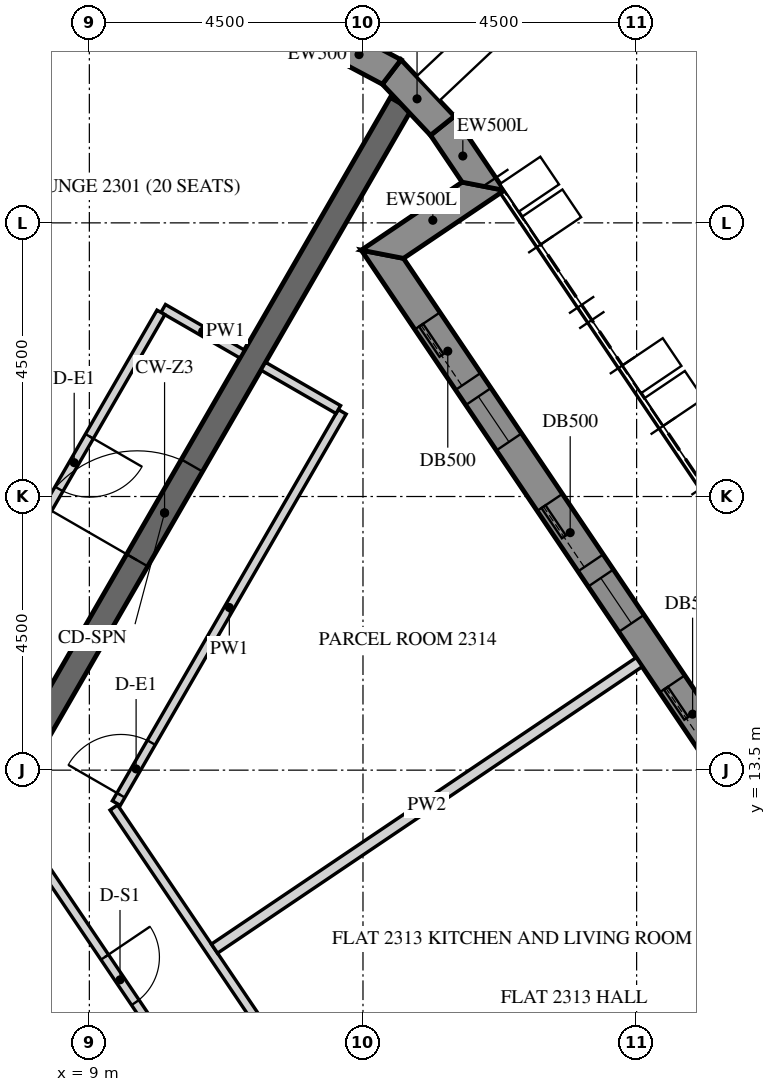
"""IFC4 building model, lengths in metres.
Left out: names, types, materials, properties, quantities, classifications, styles, units other than length and angle.
Written with IfcOpenShell. Run it as: python <this file> out.ifc"""

import sys

from ifc_helpers import new_model, si_unit, direction, frame, frame_2d, origin, place, context, subcontext, project, spatial, polyline, rectangle, outline, extrude, element, fill, save


model = new_model("IFC4")
c1 = context("Model", 3, precision=1e-05, world=origin(), true_north=direction((0.0, 1.0)))
c2 = subcontext(c1, "Body", "Model", "MODEL_VIEW")
j1 = project(units=[si_unit("LENGTHUNIT", "METRE"), si_unit("PLANEANGLEUNIT", "RADIAN")], contexts=[c1])
p1 = place(None, origin())
s1 = spatial("IfcSite", under=j1, at=p1, CompositionType="ELEMENT")
p2 = place(p1, origin())
s2 = spatial("IfcBuilding", under=s1, at=p2, CompositionType="ELEMENT")
p3 = place(p2, frame((0.0, 0.0, 291.3)))
s3 = spatial("IfcBuildingStorey", under=s2, at=p3, CompositionType="ELEMENT", Elevation=291.3)
p4 = place(p3, frame((26.706, 2.879, -0.15), z_axis=(0.0, 0.0, 1.0), x_axis=(-0.559197891507, 0.829034208061, 0.0)))
e1 = element("IfcWall", 1, at=p4, inside=s3, PredefinedType="SOLIDWALL", context=c2, shape_type="SweptSolid", body=[
    extrude(outline(polyline([(0.25, -0.25), (22.795, -0.25), (23.295, 0.25), (-0.25, 0.25), (0.25, -0.25)])), origin(), (0.0, 0.0, 1.0), 3.9),
])
p5 = place(p4, frame((1.323, 0.0, 1.05)))
e2 = element("IfcOpeningElement", 2, at=p5, cuts=e1, PredefinedType="OPENING", context=c2, shape_type="SweptSolid", body=[
    extrude(rectangle(XDim=0.9, YDim=1.5, at=frame_2d((0.45, 0.75))), frame((0.0, 0.26, 0.0), z_axis=(0.0, -1.0, 0.0), x_axis=(1.0, 0.0, 0.0)), (0.0, 0.0, 1.0), 0.52),
])
p6 = place(p4, frame((2.522, 0.0, 0.15)))
e3 = element("IfcOpeningElement", 3, at=p6, cuts=e1, PredefinedType="OPENING", context=c2, shape_type="SweptSolid", body=[
    extrude(rectangle(XDim=1.2, YDim=2.4, at=frame_2d((0.6, 1.2))), frame((0.0, 0.26, 0.0), z_axis=(0.0, -1.0, 0.0), x_axis=(1.0, 0.0, 0.0)), (0.0, 0.0, 1.0), 0.52),
])
p7 = place(p4, frame((4.922, 0.0, 1.05)))
e4 = element("IfcOpeningElement", 4, at=p7, cuts=e1, PredefinedType="OPENING", context=c2, shape_type="SweptSolid", body=[
    extrude(rectangle(XDim=0.9, YDim=1.5, at=frame_2d((0.45, 0.75))), frame((0.0, 0.26, 0.0), z_axis=(0.0, -1.0, 0.0), x_axis=(1.0, 0.0, 0.0)), (0.0, 0.0, 1.0), 0.52),
])
p8 = place(p4, frame((6.122, 0.0, 0.15)))
e5 = element("IfcOpeningElement", 5, at=p8, cuts=e1, PredefinedType="OPENING", context=c2, shape_type="SweptSolid", body=[
    extrude(rectangle(XDim=1.2, YDim=2.4, at=frame_2d((0.6, 1.2))), frame((0.0, 0.26, 0.0), z_axis=(0.0, -1.0, 0.0), x_axis=(1.0, 0.0, 0.0)), (0.0, 0.0, 1.0), 0.52),
])
p9 = place(p4, frame((8.522, 0.0, 1.05)))
e6 = element("IfcOpeningElement", 6, at=p9, cuts=e1, PredefinedType="OPENING", context=c2, shape_type="SweptSolid", body=[
    extrude(rectangle(XDim=0.9, YDim=1.5, at=frame_2d((0.45, 0.75))), frame((0.0, 0.26, 0.0), z_axis=(0.0, -1.0, 0.0), x_axis=(1.0, 0.0, 0.0)), (0.0, 0.0, 1.0), 0.52),
])
p10 = place(p4, frame((9.722, 0.0, 0.15)))
e7 = element("IfcOpeningElement", 7, at=p10, cuts=e1, PredefinedType="OPENING", context=c2, shape_type="SweptSolid", body=[
    extrude(rectangle(XDim=1.2, YDim=2.4, at=frame_2d((0.6, 1.2))), frame((0.0, 0.26, 0.0), z_axis=(0.0, -1.0, 0.0), x_axis=(1.0, 0.0, 0.0)), (0.0, 0.0, 1.0), 0.52),
])
p11 = place(p4, frame((12.122, 0.0, 1.05)))
e8 = element("IfcOpeningElement", 8, at=p11, cuts=e1, PredefinedType="OPENING", context=c2, shape_type="SweptSolid", body=[
    extrude(rectangle(XDim=0.9, YDim=1.5, at=frame_2d((0.45, 0.75))), frame((0.0, 0.26, 0.0), z_axis=(0.0, -1.0, 0.0), x_axis=(1.0, 0.0, 0.0)), (0.0, 0.0, 1.0), 0.52),
])
p12 = place(p4, frame((13.323, 0.0, 0.15)))
e9 = element("IfcOpeningElement", 9, at=p12, cuts=e1, PredefinedType="OPENING", context=c2, shape_type="SweptSolid", body=[
    extrude(rectangle(XDim=1.2, YDim=2.4, at=frame_2d((0.6, 1.2))), frame((0.0, 0.26, 0.0), z_axis=(0.0, -1.0, 0.0), x_axis=(1.0, 0.0, 0.0)), (0.0, 0.0, 1.0), 0.52),
])
p13 = place(p4, frame((15.722, 0.0, 1.05)))
e10 = element("IfcOpeningElement", 10, at=p13, cuts=e1, PredefinedType="OPENING", context=c2, shape_type="SweptSolid", body=[
    extrude(rectangle(XDim=0.9, YDim=1.5, at=frame_2d((0.45, 0.75))), frame((0.0, 0.26, 0.0), z_axis=(0.0, -1.0, 0.0), x_axis=(1.0, 0.0, 0.0)), (0.0, 0.0, 1.0), 0.52),
])
p14 = place(p4, frame((16.922, 0.0, 0.15)))
e11 = element("IfcOpeningElement", 11, at=p14, cuts=e1, PredefinedType="OPENING", context=c2, shape_type="SweptSolid", body=[
    extrude(rectangle(XDim=1.2, YDim=2.4, at=frame_2d((0.6, 1.2))), frame((0.0, 0.26, 0.0), z_axis=(0.0, -1.0, 0.0), x_axis=(1.0, 0.0, 0.0)), (0.0, 0.0, 1.0), 0.52),
])
p15 = place(p4, frame((19.323, 0.0, 1.05)))
e12 = element("IfcOpeningElement", 12, at=p15, cuts=e1, PredefinedType="OPENING", context=c2, shape_type="SweptSolid", body=[
    extrude(rectangle(XDim=0.9, YDim=1.5, at=frame_2d((0.45, 0.75))), frame((0.0, 0.26, 0.0), z_axis=(0.0, -1.0, 0.0), x_axis=(1.0, 0.0, 0.0)), (0.0, 0.0, 1.0), 0.52),
])
p16 = place(p4, frame((20.522, 0.0, 0.15)))
e13 = element("IfcOpeningElement", 13, at=p16, cuts=e1, PredefinedType="OPENING", context=c2, shape_type="SweptSolid", body=[
    extrude(rectangle(XDim=1.2, YDim=2.4, at=frame_2d((0.6, 1.2))), frame((0.0, 0.26, 0.0), z_axis=(0.0, -1.0, 0.0), x_axis=(1.0, 0.0, 0.0)), (0.0, 0.0, 1.0), 0.52),
])
p17 = place(p3, frame((13.819, 21.984, -0.15), z_axis=(0.0, 0.0, 1.0), x_axis=(0.829052389485, 0.559170935841, 0.0)))
e14 = element("IfcWall", 14, at=p17, inside=s3, PredefinedType="SOLIDWALL", context=c2, shape_type="SweptSolid", body=[
    extrude(outline(polyline([(0.25, -0.25), (2.25, -0.25), (1.75, 0.25), (-0.25, 0.25), (0.25, -0.25)])), origin(), (0.0, 0.0, 1.0), 3.9),
])
p18 = place(p3, frame((15.478, 23.102, -0.15), z_axis=(0.0, 0.0, 1.0), x_axis=(-0.559245726333, 0.829001940636, 0.0)))
e15 = element("IfcWall", 15, at=p18, inside=s3, PredefinedType="SOLIDWALL", context=c2, shape_type="SweptSolid", body=[
    extrude(outline(polyline([(-0.25, -0.25), (1.221, -0.25), (1.18, 0.25), (0.25, 0.25), (-0.25, -0.25)])), origin(), (0.0, 0.0, 1.0), 3.9),
])
p19 = place(p3, frame((14.806, 24.097, -0.15), z_axis=(0.0, 0.0, 1.0), x_axis=(-0.686234452793, 0.727380420275, 0.0)))
e16 = element("IfcWall", 16, at=p19, inside=s3, PredefinedType="SOLIDWALL", context=c2, shape_type="SweptSolid", body=[
    extrude(outline(polyline([(-0.021, -0.25), (1.257, -0.25), (1.175, 0.25), (0.021, 0.25), (-0.021, -0.25)])), origin(), (0.0, 0.0, 1.0), 3.9),
])
p20 = place(p3, frame((13.972, 24.982, -0.15), z_axis=(0.0, 0.0, 1.0), x_axis=(-0.882902492938, 0.469556373575, 0.0)))
e17 = element("IfcWall", 17, at=p20, inside=s3, PredefinedType="SOLIDWALL", context=c2, shape_type="SweptSolid", body=[
    extrude(outline(polyline([(-0.041, -0.25), (1.257, -0.25), (1.175, 0.25), (0.041, 0.25), (-0.041, -0.25)])), origin(), (0.0, 0.0, 1.0), 3.9),
])
p21 = place(p3, frame((12.471, 0.0, -0.15), z_axis=(0.0, 0.0, 1.0), x_axis=(-0.499996419489, 0.866027470984, 0.0)))
e18 = element("IfcWall", 18, at=p21, inside=s3, PredefinedType="SHEAR", context=c2, shape_type="SweptSolid", body=[
    extrude(outline(polyline([(-0.115, -0.2), (12.586, -0.2), (12.355, 0.2), (0.115, 0.2), (-0.115, -0.2)])), origin(), (0.0, 0.0, 1.0), 3.9),
])
p22 = place(p21, frame((5.306, 0.0, 0.15)))
e19 = element("IfcOpeningElement", 19, at=p22, cuts=e18, PredefinedType="OPENING", context=c2, shape_type="SweptSolid", body=[
    extrude(rectangle(XDim=1.8, YDim=2.4, at=frame_2d((0.9, 1.2))), frame((0.0, 0.21, 0.0), z_axis=(0.0, -1.0, 0.0), x_axis=(1.0, 0.0, 0.0)), (0.0, 0.0, 1.0), 0.42),
])
p23 = place(p3, frame((6.351, 11.0, -0.15), z_axis=(0.0, 0.0, 1.0), x_axis=(0.499998894578, 0.866026041999, 0.0)))
e20 = element("IfcWall", 20, at=p23, inside=s3, PredefinedType="SHEAR", context=c2, shape_type="SweptSolid", body=[
    extrude(rectangle(XDim=15.544, YDim=0.4, at=frame_2d((7.772, 0.0))), origin(), (0.0, 0.0, 1.0), 3.9),
])
p24 = place(p23, frame((6.872, 0.0, 0.15)))
e21 = element("IfcOpeningElement", 21, at=p24, cuts=e20, PredefinedType="OPENING", context=c2, shape_type="SweptSolid", body=[
    extrude(rectangle(XDim=1.8, YDim=2.4, at=frame_2d((0.9, 1.2))), frame((0.0, 0.21, 0.0), z_axis=(0.0, -1.0, 0.0), x_axis=(1.0, 0.0, 0.0)), (0.0, 0.0, 1.0), 0.42),
])
p25 = place(p3, frame((11.514, 20.343, 0.0), z_axis=(0.0, 0.0, 1.0), x_axis=(-0.866031096941, 0.499990139034, 0.0)))
e22 = element("IfcWall", 22, at=p25, inside=s3, PredefinedType="PARTITIONING", context=c2, shape_type="SweptSolid", body=[
    extrude(rectangle(XDim=1.5, YDim=0.15, at=frame_2d((0.75, 0.0))), origin(), (0.0, 0.0, 1.0), 2.988),
])
p26 = place(p3, frame((10.177, 21.027, 0.0), z_axis=(0.0, 0.0, 1.0), x_axis=(-0.500013707032, -0.866017489881, 0.0)))
e23 = element("IfcWall", 23, at=p26, inside=s3, PredefinedType="PARTITIONING", context=c2, shape_type="SweptSolid", body=[
    extrude(rectangle(XDim=5.781, YDim=0.15, at=frame_2d((2.89, 0.0))), origin(), (0.0, 0.0, 1.0), 2.988),
])
p27 = place(p26, frame((2.353, 0.0, 0.0)))
e24 = element("IfcOpeningElement", 24, at=p27, cuts=e23, PredefinedType="OPENING", context=c2, shape_type="SweptSolid", body=[
    extrude(rectangle(XDim=1.0, YDim=2.1, at=frame_2d((0.5, 1.05))), frame((0.0, 0.085, 0.0), z_axis=(0.0, -1.0, 0.0), x_axis=(1.0, 0.0, 0.0)), (0.0, 0.0, 1.0), 0.17),
])
p28 = place(p3, frame((18.875, -1.158, 0.0), z_axis=(0.0, 0.0, 1.0), x_axis=(-0.55919880344, 0.829033592945, 0.0)))
e25 = element("IfcWall", 25, at=p28, inside=s3, PredefinedType="PARTITIONING", context=c2, shape_type="SweptSolid", body=[
    extrude(rectangle(XDim=16.939, YDim=0.15, at=frame_2d((8.47, 0.0))), origin(), (0.0, 0.0, 1.0), 2.988),
])
p29 = place(p28, frame((6.09, 0.0, 0.0)))
e26 = element("IfcOpeningElement", 26, at=p29, cuts=e25, PredefinedType="OPENING", context=c2, shape_type="SweptSolid", body=[
    extrude(rectangle(XDim=1.0, YDim=2.1, at=frame_2d((0.5, 1.05))), frame((0.0, 0.085, 0.0), z_axis=(0.0, -1.0, 0.0), x_axis=(1.0, 0.0, 0.0)), (0.0, 0.0, 1.0), 0.17),
])
p30 = place(p3, frame((9.444, 12.957, 0.0), z_axis=(0.0, 0.0, 1.0), x_axis=(0.500004967958, 0.866022535513, 0.0)))
e27 = element("IfcWall", 27, at=p30, inside=s3, PredefinedType="PARTITIONING", context=c2, shape_type="SweptSolid", body=[
    extrude(rectangle(XDim=7.431, YDim=0.15, at=frame_2d((3.715, 0.0))), origin(), (0.0, 0.0, 1.0), 2.988),
])
p31 = place(p30, frame((0.15, 0.0, 0.0)))
e28 = element("IfcOpeningElement", 28, at=p31, cuts=e27, PredefinedType="OPENING", context=c2, shape_type="SweptSolid", body=[
    extrude(rectangle(XDim=1.0, YDim=2.1, at=frame_2d((0.5, 1.05))), frame((0.0, 0.085, 0.0), z_axis=(0.0, -1.0, 0.0), x_axis=(1.0, 0.0, 0.0)), (0.0, 0.0, 1.0), 0.17),
])
p32 = place(p3, frame((13.094, 19.43, 0.0), z_axis=(0.0, 0.0, 1.0), x_axis=(-0.866062911188, 0.499935029643, 0.0)))
e29 = element("IfcWall", 29, at=p32, inside=s3, PredefinedType="PARTITIONING", context=c2, shape_type="SweptSolid", body=[
    extrude(rectangle(XDim=1.425, YDim=0.15, at=frame_2d((0.712, 0.0))), origin(), (0.0, 0.0, 1.0), 2.988),
])
p33 = place(p3, frame((7.861, 12.488, 0.0), z_axis=(0.0, 0.0, 1.0), x_axis=(0.559178186788, -0.829047498893, 0.0)))
e30 = element("IfcWall", 30, at=p33, inside=s3, PredefinedType="PARTITIONING", context=c2, shape_type="SweptSolid", body=[
    extrude(rectangle(XDim=5.878, YDim=0.15, at=frame_2d((2.939, 0.0))), origin(), (0.0, 0.0, 1.0), 2.988),
])
p34 = place(p33, frame((2.489, 0.0, 0.0)))
e31 = element("IfcOpeningElement", 31, at=p34, cuts=e30, PredefinedType="OPENING", context=c2, shape_type="SweptSolid", body=[
    extrude(rectangle(XDim=0.9, YDim=2.1, at=frame_2d((0.45, 1.05))), frame((0.0, 0.085, 0.0), z_axis=(0.0, -1.0, 0.0), x_axis=(1.0, 0.0, 0.0)), (0.0, 0.0, 1.0), 0.17),
])
p35 = place(p3, frame((18.042, 15.276, 0.0), z_axis=(0.0, 0.0, 1.0), x_axis=(-0.829037762759, -0.559192621481, 0.0)))
e32 = element("IfcWall", 32, at=p35, inside=s3, PredefinedType="PARTITIONING", context=c2, shape_type="SweptSolid", body=[
    extrude(rectangle(XDim=8.425, YDim=0.18, at=frame_2d((4.212, 0.0))), origin(), (0.0, 0.0, 1.0), 2.988),
])
p36 = place(p12, frame((0.0, 0.175, 0.0)))
e33 = element("IfcDoor", 33, at=p36, inside=s3, OperationType="SLIDING_TO_LEFT", PredefinedType="DOOR", context=c2, shape_type="SweptSolid", body=[
    extrude(rectangle(XDim=1.2, YDim=2.4, at=frame_2d((0.6, 1.2))), frame((0.0, 0.025, 0.0), z_axis=(0.0, -1.0, 0.0), x_axis=(1.0, 0.0, 0.0)), (0.0, 0.0, 1.0), 0.05),
])
fill(e9, e33)
p37 = place(p13, frame((0.0, 0.18, 0.0)))
e34 = element("IfcWindow", 34, at=p37, inside=s3, PartitioningType="SINGLE_PANEL", PredefinedType="WINDOW", context=c2, shape_type="SweptSolid", body=[
    extrude(rectangle(XDim=0.9, YDim=1.5, at=frame_2d((0.45, 0.75))), frame((0.0, 0.03, 0.0), z_axis=(0.0, -1.0, 0.0), x_axis=(1.0, 0.0, 0.0)), (0.0, 0.0, 1.0), 0.06),
])
fill(e10, e34)
p38 = place(p14, frame((0.0, 0.175, 0.0)))
e35 = element("IfcDoor", 35, at=p38, inside=s3, OperationType="SLIDING_TO_LEFT", PredefinedType="DOOR", context=c2, shape_type="SweptSolid", body=[
    extrude(rectangle(XDim=1.2, YDim=2.4, at=frame_2d((0.6, 1.2))), frame((0.0, 0.025, 0.0), z_axis=(0.0, -1.0, 0.0), x_axis=(1.0, 0.0, 0.0)), (0.0, 0.0, 1.0), 0.05),
])
fill(e11, e35)
p39 = place(p15, frame((0.0, 0.18, 0.0)))
e36 = element("IfcWindow", 36, at=p39, inside=s3, PartitioningType="SINGLE_PANEL", PredefinedType="WINDOW", context=c2, shape_type="SweptSolid", body=[
    extrude(rectangle(XDim=0.9, YDim=1.5, at=frame_2d((0.45, 0.75))), frame((0.0, 0.03, 0.0), z_axis=(0.0, -1.0, 0.0), x_axis=(1.0, 0.0, 0.0)), (0.0, 0.0, 1.0), 0.06),
])
fill(e12, e36)
p40 = place(p16, frame((0.0, 0.175, 0.0)))
e37 = element("IfcDoor", 37, at=p40, inside=s3, OperationType="SLIDING_TO_LEFT", PredefinedType="DOOR", context=c2, shape_type="SweptSolid", body=[
    extrude(rectangle(XDim=1.2, YDim=2.4, at=frame_2d((0.6, 1.2))), frame((0.0, 0.025, 0.0), z_axis=(0.0, -1.0, 0.0), x_axis=(1.0, 0.0, 0.0)), (0.0, 0.0, 1.0), 0.05),
])
fill(e13, e37)
p41 = place(p24, origin())
e38 = element("IfcDoor", 38, at=p41, inside=s3, OperationType="DOUBLE_DOOR_SINGLE_SWING", PredefinedType="DOOR", context=c2, shape_type="SweptSolid", body=[
    extrude(rectangle(XDim=1.8, YDim=2.4, at=frame_2d((0.9, 1.2))), frame((0.0, 0.025, 0.0), z_axis=(0.0, -1.0, 0.0), x_axis=(1.0, 0.0, 0.0)), (0.0, 0.0, 1.0), 0.05),
])
fill(e21, e38)
p42 = place(p27, origin())
e39 = element("IfcDoor", 39, at=p42, inside=s3, OperationType="SINGLE_SWING_RIGHT", PredefinedType="DOOR", context=c2, shape_type="SweptSolid", body=[
    extrude(rectangle(XDim=1.0, YDim=2.1, at=frame_2d((0.5, 1.05))), frame((0.0, 0.025, 0.0), z_axis=(0.0, -1.0, 0.0), x_axis=(1.0, 0.0, 0.0)), (0.0, 0.0, 1.0), 0.05),
])
fill(e24, e39)
p43 = place(p31, origin())
e40 = element("IfcDoor", 40, at=p43, inside=s3, OperationType="SINGLE_SWING_RIGHT", PredefinedType="DOOR", context=c2, shape_type="SweptSolid", body=[
    extrude(rectangle(XDim=1.0, YDim=2.1, at=frame_2d((0.5, 1.05))), frame((0.0, 0.025, 0.0), z_axis=(0.0, -1.0, 0.0), x_axis=(1.0, 0.0, 0.0)), (0.0, 0.0, 1.0), 0.05),
])
fill(e28, e40)
p44 = place(p34, origin())
e41 = element("IfcDoor", 41, at=p44, inside=s3, OperationType="SINGLE_SWING_RIGHT", PredefinedType="DOOR", context=c2, shape_type="SweptSolid", body=[
    extrude(rectangle(XDim=0.9, YDim=2.1, at=frame_2d((0.45, 1.05))), frame((0.0, 0.025, 0.0), z_axis=(0.0, -1.0, 0.0), x_axis=(1.0, 0.0, 0.0)), (0.0, 0.0, 1.0), 0.05),
])
fill(e31, e41)
save(model, sys.argv[1])
